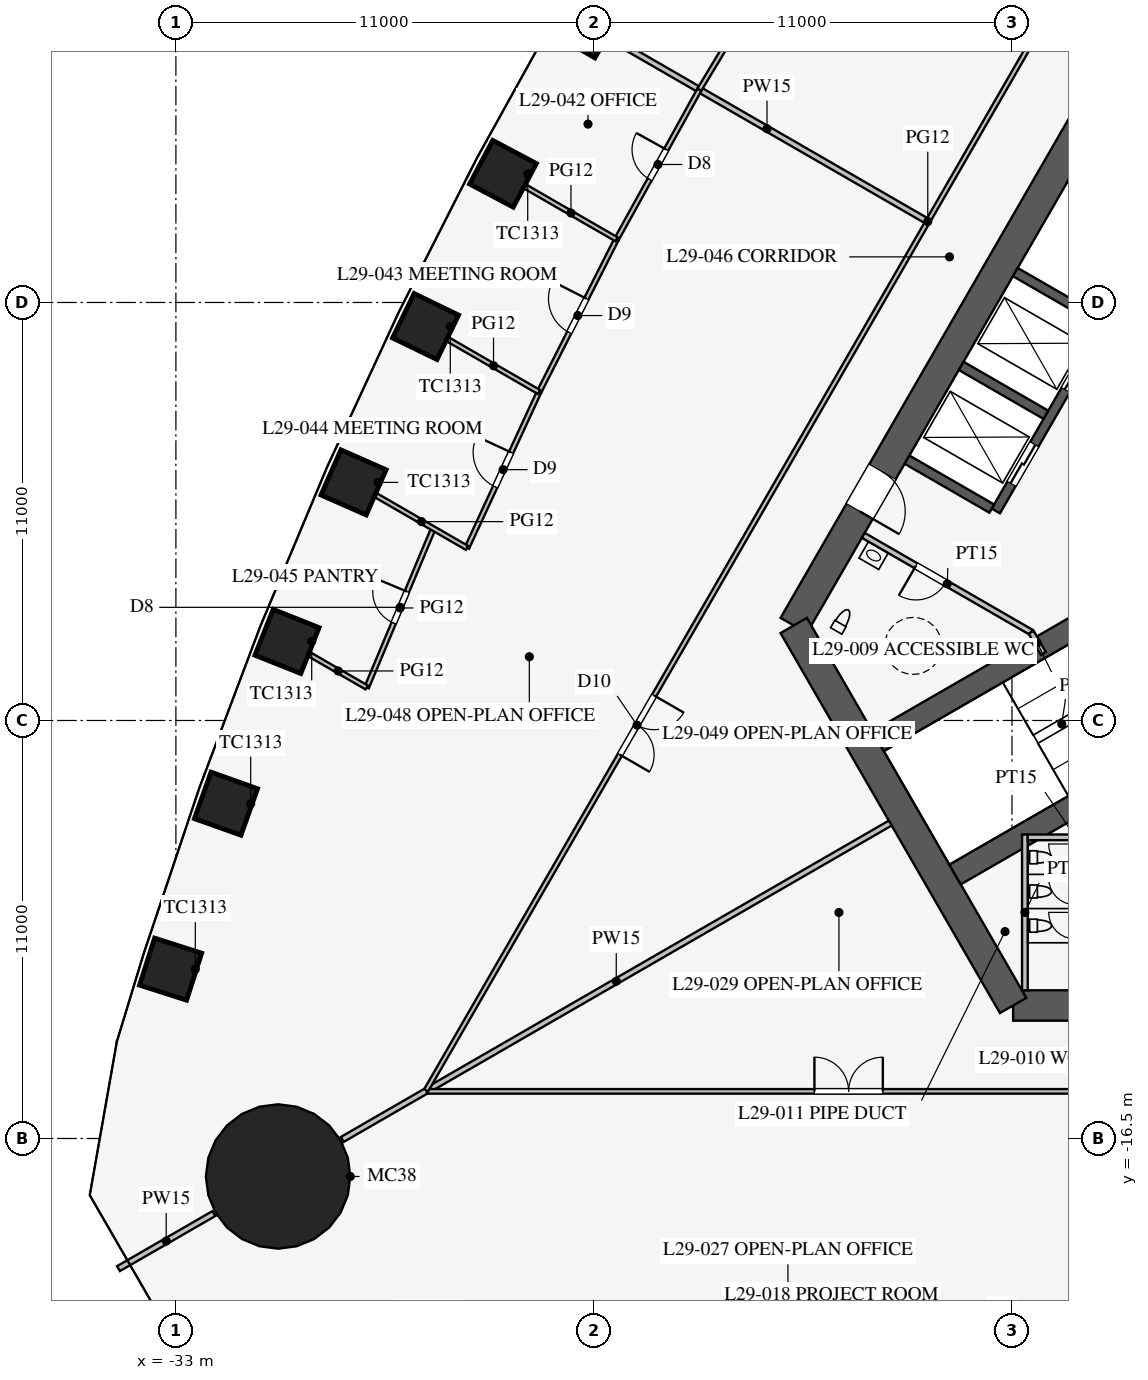
"""IFC4 building model, lengths in metres.
Left out: names, types, materials, properties, quantities, classifications, styles, units other than length and angle.
Written with IfcOpenShell. Run it as: python <this file> out.ifc"""

import sys

from ifc_helpers import new_model, si_unit, direction, frame, frame_2d, origin, origin_2d, place, context, subcontext, project, spatial, rectangle, circle, extrude, element, fill, save


model = new_model("IFC4")
c1 = context("Model", 3, precision=1e-05, world=origin(), true_north=direction((0.0, 1.0)))
c2 = subcontext(c1, "Body", "Model", "MODEL_VIEW")
j1 = project(units=[si_unit("LENGTHUNIT", "METRE"), si_unit("PLANEANGLEUNIT", "RADIAN")], contexts=[c1])
p1 = place(None, origin())
s1 = spatial("IfcSite", under=j1, at=p1, CompositionType="ELEMENT")
p2 = place(p1, origin())
s2 = spatial("IfcBuilding", under=s1, at=p2, CompositionType="ELEMENT")
p3 = place(p2, frame((0.0, 0.0, 128.3)))
s3 = spatial("IfcBuildingStorey", under=s2, at=p3, CompositionType="ELEMENT", Elevation=128.3)
for number, where, z_axis, x_axis in (
    (1, (-22.213, 12.825, 0.0), (0.0, 0.0, 1.0), (-0.5, -0.866, 0.0)),
    (2, (-24.393, 8.887, 0.0), (0.0, 0.0, 1.0), (-0.468, -0.883, 0.0)),
    (3, (-26.43, 4.867, 0.0), (0.0, 0.0, 1.0), (-0.436, -0.9, 0.0)),
    (4, (-28.325, 0.765, 0.0), (0.0, 0.0, 1.0), (-0.403, -0.915, 0.0)),
    (5, (-30.077, -3.42, 0.0), (0.0, 0.0, 1.0), (-0.37, -0.929, 0.0)),
    (6, (-31.682, -7.689, 0.0), (0.0, 0.0, 1.0), (-0.336, -0.942, 0.0)),
    (7, (-33.139, -12.044, 0.0), (0.0, 0.0, 1.0), (-0.305, -0.952, 0.0)),
):
    element("IfcColumn", number, at=place(p3, frame(where, z_axis=z_axis, x_axis=x_axis)), inside=s3, PredefinedType="COLUMN", context=c2, shape_type="SweptSolid", body=[
        extrude(rectangle(XDim=1.3, YDim=1.3, at=origin_2d()), origin(), (0.0, 0.0, 1.0), 4.2),
    ])
p4 = place(p3, frame((-30.311, -17.5, 0.0), z_axis=(0.0, 0.0, 1.0), x_axis=(1.0, 0.0, 0.0)))
e8 = element("IfcColumn", 8, at=p4, inside=s3, PredefinedType="COLUMN", context=c2, shape_type="SweptSolid", body=[
    extrude(circle(Radius=1.9, at=origin_2d()), origin(), (0.0, 0.0, 1.0), 4.2),
])
p5 = place(p3, frame((-10.97, -13.0, 0.0), z_axis=(0.0, 0.0, 1.0), x_axis=(1.0, 0.0, 0.0)))
e9 = element("IfcWall", 9, at=p5, inside=s3, PredefinedType="SHEAR", context=c2, shape_type="SweptSolid", body=[
    extrude(rectangle(XDim=21.939, YDim=0.8, at=frame_2d((10.97, 0.0))), origin(), (0.0, 0.0, 1.0), 4.2),
])
p6 = place(p5, frame((17.27, 0.0, 0.0)))
e10 = element("IfcOpeningElement", 10, at=p6, cuts=e9, PredefinedType="OPENING", context=c2, shape_type="SweptSolid", body=[
    extrude(rectangle(XDim=1.2, YDim=2.1, at=frame_2d((0.6, 1.05))), frame((0.0, 0.41, 0.0), z_axis=(0.0, -1.0, 0.0), x_axis=(1.0, 0.0, 0.0)), (0.0, 0.0, 1.0), 0.82),
])
p7 = place(p5, frame((3.47, 0.0, 0.0)))
e11 = element("IfcOpeningElement", 11, at=p7, cuts=e9, PredefinedType="OPENING", context=c2, shape_type="SweptSolid", body=[
    extrude(rectangle(XDim=1.2, YDim=2.1, at=frame_2d((0.6, 1.05))), frame((0.0, 0.41, 0.0), z_axis=(0.0, -1.0, 0.0), x_axis=(1.0, 0.0, 0.0)), (0.0, 0.0, 1.0), 0.82),
])
p8 = place(p3, frame((-5.773, 16.0, 0.0), z_axis=(0.0, 0.0, 1.0), x_axis=(-0.500002442456, -0.866023993627, 0.0)))
e12 = element("IfcWall", 12, at=p8, inside=s3, PredefinedType="SHEAR", context=c2, shape_type="SweptSolid", body=[
    extrude(rectangle(XDim=21.939, YDim=0.8, at=frame_2d((10.97, 0.0))), origin(), (0.0, 0.0, 1.0), 4.2),
])
p9 = place(p8, frame((17.27, 0.0, 0.0)))
e13 = element("IfcOpeningElement", 13, at=p9, cuts=e12, PredefinedType="OPENING", context=c2, shape_type="SweptSolid", body=[
    extrude(rectangle(XDim=1.2, YDim=2.1, at=frame_2d((0.6, 1.05))), frame((0.0, 0.41, 0.0), z_axis=(0.0, -1.0, 0.0), x_axis=(1.0, 0.0, 0.0)), (0.0, 0.0, 1.0), 0.82),
])
p10 = place(p8, frame((3.47, 0.0, 0.0)))
e14 = element("IfcOpeningElement", 14, at=p10, cuts=e12, PredefinedType="OPENING", context=c2, shape_type="SweptSolid", body=[
    extrude(rectangle(XDim=1.2, YDim=2.1, at=frame_2d((0.6, 1.05))), frame((0.0, 0.41, 0.0), z_axis=(0.0, -1.0, 0.0), x_axis=(1.0, 0.0, 0.0)), (0.0, 0.0, 1.0), 0.82),
])
p11 = place(p3, frame((-16.743, -3.0, 0.0), z_axis=(0.0, 0.0, 1.0), x_axis=(0.499995765644, -0.866027848477, 0.0)))
e15 = element("IfcWall", 15, at=p11, inside=s3, PredefinedType="SHEAR", context=c2, shape_type="SweptSolid", body=[
    extrude(rectangle(XDim=11.547, YDim=0.8, at=frame_2d((5.773, 0.0))), origin(), (0.0, 0.0, 1.0), 4.2),
])
p12 = place(p3, frame((-5.724, 9.886, 0.0), z_axis=(0.0, 0.0, 1.0), x_axis=(-0.500001763848, -0.866024385424, 0.0)))
e16 = element("IfcWall", 16, at=p12, inside=s3, PredefinedType="SHEAR", context=c2, shape_type="SweptSolid", body=[
    extrude(rectangle(XDim=11.4, YDim=0.25, at=frame_2d((5.7, 0.0))), origin(), (0.0, 0.0, 1.0), 4.2),
])
p13 = place(p12, frame((6.525, 0.0, 0.0)))
e17 = element("IfcOpeningElement", 17, at=p13, cuts=e16, PredefinedType="OPENING", context=c2, shape_type="SweptSolid", body=[
    extrude(rectangle(XDim=1.2, YDim=2.2, at=frame_2d((0.6, 1.1))), frame((0.0, 0.135, 0.0), z_axis=(0.0, -1.0, 0.0), x_axis=(1.0, 0.0, 0.0)), (0.0, 0.0, 1.0), 0.27),
])
p14 = place(p12, frame((9.375, 0.0, 0.0)))
e18 = element("IfcOpeningElement", 18, at=p14, cuts=e16, PredefinedType="OPENING", context=c2, shape_type="SweptSolid", body=[
    extrude(rectangle(XDim=1.2, YDim=2.2, at=frame_2d((0.6, 1.1))), frame((0.0, 0.135, 0.0), z_axis=(0.0, -1.0, 0.0), x_axis=(1.0, 0.0, 0.0)), (0.0, 0.0, 1.0), 0.27),
])
for number, where, z_axis, x_axis in (
    (19, (-7.257, 7.481, 0.0), (0.0, 0.0, 1.0), (-0.866, 0.5, 0.0)),
    (20, (-8.682, 5.012, 0.0), (0.0, 0.0, 1.0), (-0.866, 0.5, 0.0)),
    (21, (-10.107, 2.544, 0.0), (0.0, 0.0, 1.0), (-0.866, 0.5, 0.0)),
    (22, (-11.532, 0.076, 0.0), (0.0, 0.0, 1.0), (-0.866, 0.5, 0.0)),
):
    element("IfcWall", number, at=place(p3, frame(where, z_axis=z_axis, x_axis=x_axis)), inside=s3, PredefinedType="SHEAR", context=c2, shape_type="SweptSolid", body=[
        extrude(rectangle(XDim=2.575, YDim=0.25, at=frame_2d((1.288, 0.0))), origin(), (0.0, 0.0, 1.0), 4.2),
    ])
for number, where, z_axis, x_axis in (
    (23, (-6.663, -1.509, 0.0), (0.0, 0.0, 1.0), (-0.866, -0.5, 0.0)),
    (24, (-4.638, -5.016, 0.0), (0.0, 0.0, 1.0), (-0.866, -0.5, 0.0)),
):
    element("IfcWall", number, at=place(p3, frame(where, z_axis=z_axis, x_axis=x_axis)), inside=s3, PredefinedType="SHEAR", context=c2, shape_type="SweptSolid", body=[
        extrude(rectangle(XDim=9.075, YDim=0.6, at=frame_2d((4.538, 0.0))), origin(), (0.0, 0.0, 1.0), 4.2),
    ])
p15 = place(p3, frame((-10.495, -3.178, 0.0), z_axis=(0.0, 0.0, 1.0), x_axis=(-0.86602216432, 0.500005610874, 0.0)))
e25 = element("IfcWall", 25, at=p15, inside=s3, PredefinedType="PARTITIONING", context=c2, shape_type="SweptSolid", body=[
    extrude(rectangle(XDim=5.1, YDim=0.15, at=frame_2d((2.55, 0.0))), origin(), (0.0, 0.0, 1.0), 4.0),
])
p16 = place(p15, frame((2.6, 0.0, 0.0)))
e26 = element("IfcOpeningElement", 26, at=p16, cuts=e25, PredefinedType="OPENING", context=c2, shape_type="SweptSolid", body=[
    extrude(rectangle(XDim=0.9, YDim=2.1, at=frame_2d((0.45, 1.05))), frame((0.0, 0.085, 0.0), z_axis=(0.0, -1.0, 0.0), x_axis=(1.0, 0.0, 0.0)), (0.0, 0.0, 1.0), 0.17),
])
p17 = place(p3, frame((-10.495, -3.178, 0.0), z_axis=(0.0, 0.0, 1.0), x_axis=(0.499842556608, -0.866116284689, 0.0)))
e27 = element("IfcWall", 27, at=p17, inside=s3, PredefinedType="PARTITIONING", context=c2, shape_type="SweptSolid", body=[
    extrude(rectangle(XDim=0.645, YDim=0.15, at=frame_2d((0.323, 0.0))), origin(), (0.0, 0.0, 1.0), 4.0),
])
p18 = place(p3, frame((-10.66, -8.5, 0.0), z_axis=(0.0, 0.0, 1.0), x_axis=(0.0, -1.0, 0.0)))
e28 = element("IfcWall", 28, at=p18, inside=s3, PredefinedType="PARTITIONING", context=c2, shape_type="SweptSolid", body=[
    extrude(rectangle(XDim=4.1, YDim=0.15, at=frame_2d((2.05, 0.0))), origin(), (0.0, 0.0, 1.0), 4.0),
])
p19 = place(p3, frame((-8.075, -8.575, 0.0), z_axis=(0.0, 0.0, 1.0), x_axis=(-1.0, 0.0, 0.0)))
e29 = element("IfcWall", 29, at=p19, inside=s3, PredefinedType="PARTITIONING", context=c2, shape_type="SweptSolid", body=[
    extrude(rectangle(XDim=2.51, YDim=0.15, at=frame_2d((1.255, 0.0))), origin(), (0.0, 0.0, 1.0), 4.0),
])
p20 = place(p3, frame((-14.203, -8.2, 0.0), z_axis=(0.0, 0.0, 1.0), x_axis=(-0.866024668836, -0.500001272966, 0.0)))
e30 = element("IfcWall", 30, at=p20, inside=s3, PredefinedType="PARTITIONING", context=c2, shape_type="SweptSolid", body=[
    extrude(rectangle(XDim=16.65, YDim=0.15, at=frame_2d((8.325, 0.0))), origin(), (0.0, 0.0, 1.0), 2.3),
])
p21 = place(p3, frame((-32.0, -18.475, 0.0), z_axis=(0.0, 0.0, 1.0), x_axis=(-0.866042548026, -0.499970304126, 0.0)))
e31 = element("IfcWall", 31, at=p21, inside=s3, PredefinedType="PARTITIONING", context=c2, shape_type="SweptSolid", body=[
    extrude(rectangle(XDim=2.899, YDim=0.15, at=frame_2d((1.45, 0.0))), origin(), (0.0, 0.0, 1.0), 2.3),
])
p22 = place(p3, frame((-26.398, -15.26, 0.0), z_axis=(0.0, 0.0, 1.0), x_axis=(1.0, 0.0, 0.0)))
e32 = element("IfcWall", 32, at=p22, inside=s3, PredefinedType="PARTITIONING", context=c2, shape_type="SweptSolid", body=[
    extrude(rectangle(XDim=52.796, YDim=0.12, at=frame_2d((26.398, 0.0))), origin(), (0.0, 0.0, 1.0), 2.9),
])
p23 = place(p22, frame((10.2, 0.0, 0.15)))
e33 = element("IfcOpeningElement", 33, at=p23, cuts=e32, PredefinedType="OPENING", context=c2, shape_type="SweptSolid", body=[
    extrude(rectangle(XDim=1.8, YDim=2.1, at=frame_2d((0.9, 1.05))), frame((0.0, 0.07, 0.0), z_axis=(0.0, -1.0, 0.0), x_axis=(1.0, 0.0, 0.0)), (0.0, 0.0, 1.0), 0.14),
])
p24 = place(p22, frame((40.8, 0.0, 0.15)))
e34 = element("IfcOpeningElement", 34, at=p24, cuts=e32, PredefinedType="OPENING", context=c2, shape_type="SweptSolid", body=[
    extrude(rectangle(XDim=1.8, YDim=2.1, at=frame_2d((0.9, 1.05))), frame((0.0, 0.07, 0.0), z_axis=(0.0, -1.0, 0.0), x_axis=(1.0, 0.0, 0.0)), (0.0, 0.0, 1.0), 0.14),
])
p25 = place(p3, frame((-13.268, 7.66, 0.0), z_axis=(0.0, 0.0, 1.0), x_axis=(-0.866015788683, 0.500016653474, 0.0)))
e35 = element("IfcWall", 35, at=p25, inside=s3, PredefinedType="PARTITIONING", context=c2, shape_type="SweptSolid", body=[
    extrude(rectangle(XDim=9.65, YDim=0.15, at=frame_2d((4.825, 0.0))), origin(), (0.0, 0.0, 1.0), 3.2),
])
p26 = place(p3, frame((-0.016, 30.491, 0.0), z_axis=(0.0, 0.0, 1.0), x_axis=(-0.50000091641, -0.866024874695, 0.0)))
e36 = element("IfcWall", 36, at=p26, inside=s3, PredefinedType="PARTITIONING", context=c2, shape_type="SweptSolid", body=[
    extrude(rectangle(XDim=52.796, YDim=0.12, at=frame_2d((26.398, 0.0))), origin(), (0.0, 0.0, 1.0), 2.9),
])
p27 = place(p26, frame((10.2, 0.0, 0.15)))
e37 = element("IfcOpeningElement", 37, at=p27, cuts=e36, PredefinedType="OPENING", context=c2, shape_type="SweptSolid", body=[
    extrude(rectangle(XDim=1.8, YDim=2.1, at=frame_2d((0.9, 1.05))), frame((0.0, 0.07, 0.0), z_axis=(0.0, -1.0, 0.0), x_axis=(1.0, 0.0, 0.0)), (0.0, 0.0, 1.0), 0.14),
])
p28 = place(p26, frame((40.8, 0.0, 0.15)))
e38 = element("IfcOpeningElement", 38, at=p28, cuts=e36, PredefinedType="OPENING", context=c2, shape_type="SweptSolid", body=[
    extrude(rectangle(XDim=1.8, YDim=2.1, at=frame_2d((0.9, 1.05))), frame((0.0, 0.07, 0.0), z_axis=(0.0, -1.0, 0.0), x_axis=(1.0, 0.0, 0.0)), (0.0, 0.0, 1.0), 0.14),
])
p29 = place(p3, frame((-19.226, 11.1, 0.0), z_axis=(0.0, 0.0, 1.0), x_axis=(-0.484292898211, -0.874905931368, 0.0)))
e39 = element("IfcWall", 39, at=p29, inside=s3, PredefinedType="PARTITIONING", context=c2, shape_type="SweptSolid", body=[
    extrude(rectangle(XDim=4.501, YDim=0.12, at=frame_2d((2.25, 0.0))), origin(), (0.0, 0.0, 1.0), 2.9),
])
p30 = place(p29, frame((1.8, 0.0, 0.15)))
e40 = element("IfcOpeningElement", 40, at=p30, cuts=e39, PredefinedType="OPENING", context=c2, shape_type="SweptSolid", body=[
    extrude(rectangle(XDim=0.9, YDim=2.1, at=frame_2d((0.45, 1.05))), frame((0.0, 0.07, 0.0), z_axis=(0.0, -1.0, 0.0), x_axis=(1.0, 0.0, 0.0)), (0.0, 0.0, 1.0), 0.14),
])
p31 = place(p3, frame((-26.225, -0.448, 0.0), z_axis=(0.0, 0.0, 1.0), x_axis=(-0.386762112496, -0.922179520667, 0.0)))
e41 = element("IfcWall", 41, at=p31, inside=s3, PredefinedType="PARTITIONING", context=c2, shape_type="SweptSolid", body=[
    extrude(rectangle(XDim=4.536, YDim=0.12, at=frame_2d((2.268, 0.0))), origin(), (0.0, 0.0, 1.0), 2.9),
])
p32 = place(p31, frame((1.8, 0.0, 0.15)))
e42 = element("IfcOpeningElement", 42, at=p32, cuts=e41, PredefinedType="OPENING", context=c2, shape_type="SweptSolid", body=[
    extrude(rectangle(XDim=0.9, YDim=2.1, at=frame_2d((0.45, 1.05))), frame((0.0, 0.07, 0.0), z_axis=(0.0, -1.0, 0.0), x_axis=(1.0, 0.0, 0.0)), (0.0, 0.0, 1.0), 0.14),
])
p33 = place(p3, frame((-21.405, 7.162, 0.0), z_axis=(0.0, 0.0, 1.0), x_axis=(-0.452471679136, -0.891778772779, 0.0)))
e43 = element("IfcWall", 43, at=p33, inside=s3, PredefinedType="PARTITIONING", context=c2, shape_type="SweptSolid", body=[
    extrude(rectangle(XDim=4.507, YDim=0.12, at=frame_2d((2.253, 0.0))), origin(), (0.0, 0.0, 1.0), 2.9),
])
p34 = place(p33, frame((1.75, 0.0, 0.15)))
e44 = element("IfcOpeningElement", 44, at=p34, cuts=e43, PredefinedType="OPENING", context=c2, shape_type="SweptSolid", body=[
    extrude(rectangle(XDim=1.0, YDim=2.1, at=frame_2d((0.5, 1.05))), frame((0.0, 0.07, 0.0), z_axis=(0.0, -1.0, 0.0), x_axis=(1.0, 0.0, 0.0)), (0.0, 0.0, 1.0), 0.14),
])
p35 = place(p3, frame((-23.444, 3.143, 0.0), z_axis=(0.0, 0.0, 1.0), x_axis=(-0.419883773418, -0.907577884713, 0.0)))
e45 = element("IfcWall", 45, at=p35, inside=s3, PredefinedType="PARTITIONING", context=c2, shape_type="SweptSolid", body=[
    extrude(rectangle(XDim=4.519, YDim=0.12, at=frame_2d((2.259, 0.0))), origin(), (0.0, 0.0, 1.0), 2.9),
])
p36 = place(p35, frame((1.75, 0.0, 0.15)))
e46 = element("IfcOpeningElement", 46, at=p36, cuts=e45, PredefinedType="OPENING", context=c2, shape_type="SweptSolid", body=[
    extrude(rectangle(XDim=1.0, YDim=2.1, at=frame_2d((0.5, 1.05))), frame((0.0, 0.07, 0.0), z_axis=(0.0, -1.0, 0.0), x_axis=(1.0, 0.0, 0.0)), (0.0, 0.0, 1.0), 0.14),
])
p37 = place(p3, frame((-16.905, 14.956, 0.0), z_axis=(0.0, 0.0, 1.0), x_axis=(-0.515548366618, -0.856860479703, 0.0)))
e47 = element("IfcWall", 47, at=p37, inside=s3, PredefinedType="PARTITIONING", context=c2, shape_type="SweptSolid", body=[
    extrude(rectangle(XDim=4.501, YDim=0.12, at=frame_2d((2.25, 0.0))), origin(), (0.0, 0.0, 1.0), 2.9),
])
p38 = place(p37, frame((1.8, 0.0, 0.15)))
e48 = element("IfcOpeningElement", 48, at=p38, cuts=e47, PredefinedType="OPENING", context=c2, shape_type="SweptSolid", body=[
    extrude(rectangle(XDim=0.9, YDim=2.1, at=frame_2d((0.45, 1.05))), frame((0.0, 0.07, 0.0), z_axis=(0.0, -1.0, 0.0), x_axis=(1.0, 0.0, 0.0)), (0.0, 0.0, 1.0), 0.14),
])
p39 = place(p3, frame((-25.342, -0.958, 0.0), z_axis=(0.0, 0.0, 1.0), x_axis=(-0.866014808974, 0.500018350302, 0.0)))
e49 = element("IfcWall", 49, at=p39, inside=s3, PredefinedType="PARTITIONING", context=c2, shape_type="SweptSolid", body=[
    extrude(rectangle(XDim=2.762, YDim=0.12, at=frame_2d((1.381, 0.0))), origin(), (0.0, 0.0, 1.0), 2.9),
])
p40 = place(p3, frame((-27.979, -4.631, 0.0), z_axis=(0.0, 0.0, 1.0), x_axis=(-0.866016800201, 0.500014901547, 0.0)))
e50 = element("IfcWall", 50, at=p40, inside=s3, PredefinedType="PARTITIONING", context=c2, shape_type="SweptSolid", body=[
    extrude(rectangle(XDim=1.734, YDim=0.12, at=frame_2d((0.867, 0.0))), origin(), (0.0, 0.0, 1.0), 2.9),
])
p41 = place(p3, frame((-21.405, 7.162, 0.0), z_axis=(0.0, 0.0, 1.0), x_axis=(-0.866015261085, 0.500017567259, 0.0)))
e51 = element("IfcWall", 51, at=p41, inside=s3, PredefinedType="PARTITIONING", context=c2, shape_type="SweptSolid", body=[
    extrude(rectangle(XDim=2.769, YDim=0.12, at=frame_2d((1.385, 0.0))), origin(), (0.0, 0.0, 1.0), 2.9),
])
p42 = place(p3, frame((-23.444, 3.143, 0.0), z_axis=(0.0, 0.0, 1.0), x_axis=(-0.866023907196, 0.500002592159, 0.0)))
e52 = element("IfcWall", 52, at=p42, inside=s3, PredefinedType="PARTITIONING", context=c2, shape_type="SweptSolid", body=[
    extrude(rectangle(XDim=2.766, YDim=0.12, at=frame_2d((1.383, 0.0))), origin(), (0.0, 0.0, 1.0), 2.9),
])
p43 = place(p16, origin())
e53 = element("IfcDoor", 53, at=p43, inside=s3, OperationType="SINGLE_SWING_RIGHT", PredefinedType="DOOR", context=c2, shape_type="SweptSolid", body=[
    extrude(rectangle(XDim=0.9, YDim=2.1, at=frame_2d((0.45, 1.05))), frame((0.0, 0.025, 0.0), z_axis=(0.0, -1.0, 0.0), x_axis=(1.0, 0.0, 0.0)), (0.0, 0.0, 1.0), 0.05),
])
fill(e26, e53)
p44 = place(p9, origin())
e54 = element("IfcDoor", 54, at=p44, inside=s3, OperationType="SINGLE_SWING_RIGHT", PredefinedType="DOOR", context=c2, shape_type="SweptSolid", body=[
    extrude(rectangle(XDim=1.2, YDim=2.1, at=frame_2d((0.6, 1.05))), frame((0.0, 0.025, 0.0), z_axis=(0.0, -1.0, 0.0), x_axis=(1.0, 0.0, 0.0)), (0.0, 0.0, 1.0), 0.05),
])
fill(e13, e54)
p45 = place(p23, origin())
e55 = element("IfcDoor", 55, at=p45, inside=s3, OperationType="DOUBLE_DOOR_SINGLE_SWING", PredefinedType="DOOR", context=c2, shape_type="SweptSolid", body=[
    extrude(rectangle(XDim=1.8, YDim=2.1, at=frame_2d((0.9, 1.05))), frame((0.0, 0.025, 0.0), z_axis=(0.0, -1.0, 0.0), x_axis=(1.0, 0.0, 0.0)), (0.0, 0.0, 1.0), 0.05),
])
fill(e33, e55)
p46 = place(p30, frame((0.9, 0.0, 0.0), z_axis=(0.0, 0.0, 1.0), x_axis=(-1.0, 0.0, 0.0)))
e56 = element("IfcDoor", 56, at=p46, inside=s3, OperationType="SINGLE_SWING_RIGHT", PredefinedType="DOOR", context=c2, shape_type="SweptSolid", body=[
    extrude(rectangle(XDim=0.9, YDim=2.1, at=frame_2d((0.45, 1.05))), frame((0.0, 0.025, 0.0), z_axis=(0.0, -1.0, 0.0), x_axis=(1.0, 0.0, 0.0)), (0.0, 0.0, 1.0), 0.05),
])
fill(e40, e56)
p47 = place(p34, frame((1.0, 0.0, 0.0), z_axis=(0.0, 0.0, 1.0), x_axis=(-1.0, 0.0, 0.0)))
e57 = element("IfcDoor", 57, at=p47, inside=s3, OperationType="SINGLE_SWING_RIGHT", PredefinedType="DOOR", context=c2, shape_type="SweptSolid", body=[
    extrude(rectangle(XDim=1.0, YDim=2.1, at=frame_2d((0.5, 1.05))), frame((0.0, 0.025, 0.0), z_axis=(0.0, -1.0, 0.0), x_axis=(1.0, 0.0, 0.0)), (0.0, 0.0, 1.0), 0.05),
])
fill(e44, e57)
p48 = place(p36, frame((1.0, 0.0, 0.0), z_axis=(0.0, 0.0, 1.0), x_axis=(-1.0, 0.0, 0.0)))
e58 = element("IfcDoor", 58, at=p48, inside=s3, OperationType="SINGLE_SWING_RIGHT", PredefinedType="DOOR", context=c2, shape_type="SweptSolid", body=[
    extrude(rectangle(XDim=1.0, YDim=2.1, at=frame_2d((0.5, 1.05))), frame((0.0, 0.025, 0.0), z_axis=(0.0, -1.0, 0.0), x_axis=(1.0, 0.0, 0.0)), (0.0, 0.0, 1.0), 0.05),
])
fill(e46, e58)
p49 = place(p32, frame((0.9, 0.0, 0.0), z_axis=(0.0, 0.0, 1.0), x_axis=(-1.0, 0.0, 0.0)))
e59 = element("IfcDoor", 59, at=p49, inside=s3, OperationType="SINGLE_SWING_RIGHT", PredefinedType="DOOR", context=c2, shape_type="SweptSolid", body=[
    extrude(rectangle(XDim=0.9, YDim=2.1, at=frame_2d((0.45, 1.05))), frame((0.0, 0.025, 0.0), z_axis=(0.0, -1.0, 0.0), x_axis=(1.0, 0.0, 0.0)), (0.0, 0.0, 1.0), 0.05),
])
fill(e42, e59)
p50 = place(p28, origin())
e60 = element("IfcDoor", 60, at=p50, inside=s3, OperationType="DOUBLE_DOOR_SINGLE_SWING", PredefinedType="DOOR", context=c2, shape_type="SweptSolid", body=[
    extrude(rectangle(XDim=1.8, YDim=2.1, at=frame_2d((0.9, 1.05))), frame((0.0, 0.025, 0.0), z_axis=(0.0, -1.0, 0.0), x_axis=(1.0, 0.0, 0.0)), (0.0, 0.0, 1.0), 0.05),
])
fill(e38, e60)
p51 = place(p13, origin())
e61 = element("IfcDoor", 61, at=p51, inside=s3, OperationType="DOUBLE_DOOR_SLIDING", PredefinedType="DOOR", context=c2, shape_type="SweptSolid", body=[
    extrude(rectangle(XDim=1.2, YDim=2.2, at=frame_2d((0.6, 1.1))), frame((0.0, 0.025, 0.0), z_axis=(0.0, -1.0, 0.0), x_axis=(1.0, 0.0, 0.0)), (0.0, 0.0, 1.0), 0.05),
])
fill(e17, e61)
p52 = place(p14, origin())
e62 = element("IfcDoor", 62, at=p52, inside=s3, OperationType="DOUBLE_DOOR_SLIDING", PredefinedType="DOOR", context=c2, shape_type="SweptSolid", body=[
    extrude(rectangle(XDim=1.2, YDim=2.2, at=frame_2d((0.6, 1.1))), frame((0.0, 0.025, 0.0), z_axis=(0.0, -1.0, 0.0), x_axis=(1.0, 0.0, 0.0)), (0.0, 0.0, 1.0), 0.05),
])
fill(e18, e62)
save(model, sys.argv[1])
